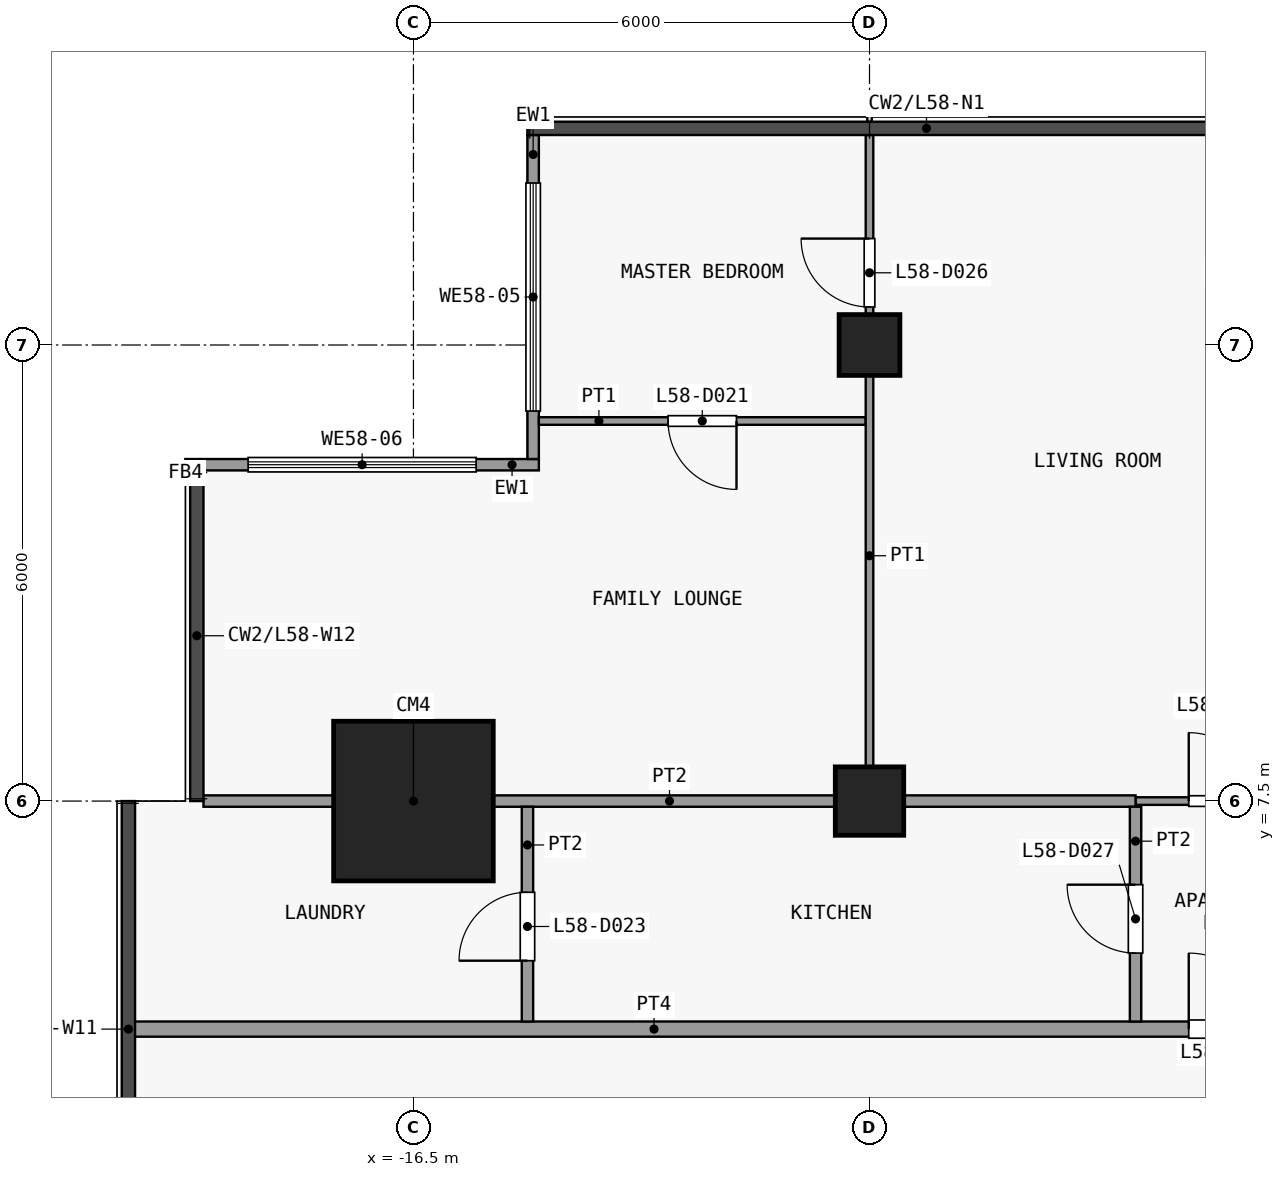
"""IFC4 building model, lengths in metres.
Left out: names, types, materials, properties, quantities, classifications, styles, units other than length and angle.
Written with IfcOpenShell. Run it as: python <this file> out.ifc"""

import sys

from ifc_helpers import new_model, si_unit, direction, frame, frame_2d, origin, origin_2d, place, context, subcontext, project, spatial, rectangle, extrude, element, fill, save


model = new_model("IFC4")
c1 = context("Model", 3, precision=1e-05, world=origin(), true_north=direction((0.0, 1.0)))
c2 = subcontext(c1, "Body", "Model", "MODEL_VIEW")
j1 = project(units=[si_unit("LENGTHUNIT", "METRE"), si_unit("PLANEANGLEUNIT", "RADIAN")], contexts=[c1])
p1 = place(None, origin())
s1 = spatial("IfcSite", under=j1, at=p1, CompositionType="ELEMENT")
p2 = place(p1, origin())
s2 = spatial("IfcBuilding", under=s1, at=p2, CompositionType="ELEMENT")
p3 = place(p2, frame((0.0, 0.0, 230.3)))
s3 = spatial("IfcBuildingStorey", under=s2, at=p3, CompositionType="ELEMENT", Elevation=230.3)
p4 = place(p3, frame((-16.5, 7.5, 0.0), z_axis=(0.0, 0.0, 1.0), x_axis=(1.0, 0.0, 0.0)))
e1 = element("IfcColumn", 1, at=p4, inside=s3, PredefinedType="COLUMN", context=c2, shape_type="SweptSolid", body=[
    extrude(rectangle(XDim=2.1, YDim=2.1, at=origin_2d()), origin(), (0.0, 0.0, 1.0), 3.6),
])
p5 = place(p3, frame((-10.5, 7.5, 0.0), z_axis=(0.0, 0.0, 1.0), x_axis=(1.0, 0.0, 0.0)))
e2 = element("IfcColumn", 2, at=p5, inside=s3, PredefinedType="COLUMN", context=c2, shape_type="SweptSolid", body=[
    extrude(rectangle(XDim=0.9, YDim=0.9, at=origin_2d()), origin(), (0.0, 0.0, 1.0), 3.6),
])
p6 = place(p3, frame((-10.5, 13.5, 0.0), z_axis=(0.0, 0.0, 1.0), x_axis=(1.0, 0.0, 0.0)))
e3 = element("IfcColumn", 3, at=p6, inside=s3, PredefinedType="COLUMN", context=c2, shape_type="SweptSolid", body=[
    extrude(rectangle(XDim=0.8, YDim=0.8, at=origin_2d()), origin(), (0.0, 0.0, 1.0), 3.6),
])
p7 = place(p3, frame((-14.925, 12.0, 0.0), z_axis=(0.0, 0.0, 1.0), x_axis=(0.0, 1.0, 0.0)))
e4 = element("IfcWall", 4, at=p7, inside=s3, PredefinedType="SOLIDWALL", context=c2, shape_type="SweptSolid", body=[
    extrude(rectangle(XDim=4.262, YDim=0.15, at=frame_2d((2.131, 0.0))), origin(), (0.0, 0.0, 1.0), 3.3),
])
p8 = place(p7, frame((0.631, 0.0, 0.9)))
e5 = element("IfcOpeningElement", 5, at=p8, cuts=e4, PredefinedType="OPENING", context=c2, shape_type="SweptSolid", body=[
    extrude(rectangle(XDim=3.0, YDim=2.4, at=frame_2d((1.5, 1.2))), frame((0.0, 0.085, 0.0), z_axis=(0.0, -1.0, 0.0), x_axis=(1.0, 0.0, 0.0)), (0.0, 0.0, 1.0), 0.17),
])
p9 = place(p3, frame((-19.5, 11.925, 0.0), z_axis=(0.0, 0.0, 1.0), x_axis=(1.0, 0.0, 0.0)))
e6 = element("IfcWall", 6, at=p9, inside=s3, PredefinedType="SOLIDWALL", context=c2, shape_type="SweptSolid", body=[
    extrude(rectangle(XDim=4.65, YDim=0.15, at=frame_2d((2.325, 0.0))), origin(), (0.0, 0.0, 1.0), 3.3),
])
p10 = place(p9, frame((0.825, 0.0, 0.9)))
e7 = element("IfcOpeningElement", 7, at=p10, cuts=e6, PredefinedType="OPENING", context=c2, shape_type="SweptSolid", body=[
    extrude(rectangle(XDim=3.0, YDim=2.4, at=frame_2d((1.5, 1.2))), frame((0.0, 0.085, 0.0), z_axis=(0.0, -1.0, 0.0), x_axis=(1.0, 0.0, 0.0)), (0.0, 0.0, 1.0), 0.17),
])
p11 = place(p3, frame((-20.25, 4.5, 0.0), z_axis=(0.0, 0.0, 1.0), x_axis=(1.0, 0.0, 0.0)))
e8 = element("IfcWall", 8, at=p11, inside=s3, PredefinedType="PARTITIONING", context=c2, shape_type="SweptSolid", body=[
    extrude(rectangle(XDim=39.6, YDim=0.2, at=frame_2d((19.8, 0.0))), origin(), (0.0, 0.0, 1.0), 3.3),
])
p12 = place(p11, frame((13.95, 0.0, 0.0)))
e9 = element("IfcOpeningElement", 9, at=p12, cuts=e8, PredefinedType="OPENING", context=c2, shape_type="SweptSolid", body=[
    extrude(rectangle(XDim=1.0, YDim=2.1, at=frame_2d((0.5, 1.05))), frame((0.0, 0.11, 0.0), z_axis=(0.0, -1.0, 0.0), x_axis=(1.0, 0.0, 0.0)), (0.0, 0.0, 1.0), 0.22),
])
p13 = place(p11, frame((27.25, 0.0, 0.0)))
e10 = element("IfcOpeningElement", 10, at=p13, cuts=e8, PredefinedType="OPENING", context=c2, shape_type="SweptSolid", body=[
    extrude(rectangle(XDim=0.9, YDim=2.1, at=frame_2d((0.45, 1.05))), frame((0.0, 0.11, 0.0), z_axis=(0.0, -1.0, 0.0), x_axis=(1.0, 0.0, 0.0)), (0.0, 0.0, 1.0), 0.22),
])
p14 = place(p11, frame((33.25, 0.0, 0.0)))
e11 = element("IfcOpeningElement", 11, at=p14, cuts=e8, PredefinedType="OPENING", context=c2, shape_type="SweptSolid", body=[
    extrude(rectangle(XDim=0.9, YDim=2.1, at=frame_2d((0.45, 1.05))), frame((0.0, 0.11, 0.0), z_axis=(0.0, -1.0, 0.0), x_axis=(1.0, 0.0, 0.0)), (0.0, 0.0, 1.0), 0.22),
])
p15 = place(p11, frame((37.75, 0.0, 0.0)))
e12 = element("IfcOpeningElement", 12, at=p15, cuts=e8, PredefinedType="OPENING", context=c2, shape_type="SweptSolid", body=[
    extrude(rectangle(XDim=0.9, YDim=2.1, at=frame_2d((0.45, 1.05))), frame((0.0, 0.11, 0.0), z_axis=(0.0, -1.0, 0.0), x_axis=(1.0, 0.0, 0.0)), (0.0, 0.0, 1.0), 0.22),
])
p16 = place(p3, frame((-7.0, 7.5, 0.0), z_axis=(0.0, 0.0, 1.0), x_axis=(1.0, 0.0, 0.0)))
e13 = element("IfcWall", 13, at=p16, inside=s3, PredefinedType="PARTITIONING", context=c2, shape_type="SweptSolid", body=[
    extrude(rectangle(XDim=2.4, YDim=0.1, at=frame_2d((1.2, 0.0))), origin(), (0.0, 0.0, 1.0), 3.3),
])
p17 = place(p16, frame((0.7, 0.0, 0.0)))
e14 = element("IfcOpeningElement", 14, at=p17, cuts=e13, PredefinedType="OPENING", context=c2, shape_type="SweptSolid", body=[
    extrude(rectangle(XDim=0.9, YDim=2.1, at=frame_2d((0.45, 1.05))), frame((0.0, 0.06, 0.0), z_axis=(0.0, -1.0, 0.0), x_axis=(1.0, 0.0, 0.0)), (0.0, 0.0, 1.0), 0.12),
])
p18 = place(p3, frame((-19.262, 7.5, 0.0), z_axis=(0.0, 0.0, 1.0), x_axis=(1.0, 0.0, 0.0)))
e15 = element("IfcWall", 15, at=p18, inside=s3, PredefinedType="PARTITIONING", context=c2, shape_type="SweptSolid", body=[
    extrude(rectangle(XDim=12.262, YDim=0.15, at=frame_2d((6.131, 0.0))), origin(), (0.0, 0.0, 1.0), 3.3),
])
p19 = place(p3, frame((-14.85, 12.5, 0.0), z_axis=(0.0, 0.0, 1.0), x_axis=(1.0, 0.0, 0.0)))
e16 = element("IfcWall", 16, at=p19, inside=s3, PredefinedType="PARTITIONING", context=c2, shape_type="SweptSolid", body=[
    extrude(rectangle(XDim=4.3, YDim=0.1, at=frame_2d((2.15, 0.0))), origin(), (0.0, 0.0, 1.0), 3.3),
])
p20 = place(p19, frame((1.7, 0.0, 0.0)))
e17 = element("IfcOpeningElement", 17, at=p20, cuts=e16, PredefinedType="OPENING", context=c2, shape_type="SweptSolid", body=[
    extrude(rectangle(XDim=0.9, YDim=2.1, at=frame_2d((0.45, 1.05))), frame((0.0, 0.06, 0.0), z_axis=(0.0, -1.0, 0.0), x_axis=(1.0, 0.0, 0.0)), (0.0, 0.0, 1.0), 0.12),
])
p21 = place(p3, frame((-15.0, 4.6, 0.0), z_axis=(0.0, 0.0, 1.0), x_axis=(0.0, 1.0, 0.0)))
e18 = element("IfcWall", 18, at=p21, inside=s3, PredefinedType="PARTITIONING", context=c2, shape_type="SweptSolid", body=[
    extrude(rectangle(XDim=2.825, YDim=0.15, at=frame_2d((1.413, 0.0))), origin(), (0.0, 0.0, 1.0), 3.3),
])
p22 = place(p21, frame((0.8, 0.0, 0.0)))
e19 = element("IfcOpeningElement", 19, at=p22, cuts=e18, PredefinedType="OPENING", context=c2, shape_type="SweptSolid", body=[
    extrude(rectangle(XDim=0.9, YDim=2.1, at=frame_2d((0.45, 1.05))), frame((0.0, 0.085, 0.0), z_axis=(0.0, -1.0, 0.0), x_axis=(1.0, 0.0, 0.0)), (0.0, 0.0, 1.0), 0.17),
])
p23 = place(p3, frame((-10.5, 7.575, 0.0), z_axis=(0.0, 0.0, 1.0), x_axis=(0.0, 1.0, 0.0)))
e20 = element("IfcWall", 20, at=p23, inside=s3, PredefinedType="PARTITIONING", context=c2, shape_type="SweptSolid", body=[
    extrude(rectangle(XDim=8.688, YDim=0.1, at=frame_2d((4.344, 0.0))), origin(), (0.0, 0.0, 1.0), 3.3),
])
p24 = place(p23, frame((6.425, 0.0, 0.0)))
e21 = element("IfcOpeningElement", 21, at=p24, cuts=e20, PredefinedType="OPENING", context=c2, shape_type="SweptSolid", body=[
    extrude(rectangle(XDim=0.9, YDim=2.1, at=frame_2d((0.45, 1.05))), frame((0.0, 0.06, 0.0), z_axis=(0.0, -1.0, 0.0), x_axis=(1.0, 0.0, 0.0)), (0.0, 0.0, 1.0), 0.12),
])
p25 = place(p3, frame((-7.0, 4.6, 0.0), z_axis=(0.0, 0.0, 1.0), x_axis=(0.0, 1.0, 0.0)))
e22 = element("IfcWall", 22, at=p25, inside=s3, PredefinedType="PARTITIONING", context=c2, shape_type="SweptSolid", body=[
    extrude(rectangle(XDim=2.825, YDim=0.15, at=frame_2d((1.413, 0.0))), origin(), (0.0, 0.0, 1.0), 3.3),
])
p26 = place(p25, frame((0.9, 0.0, 0.0)))
e23 = element("IfcOpeningElement", 23, at=p26, cuts=e22, PredefinedType="OPENING", context=c2, shape_type="SweptSolid", body=[
    extrude(rectangle(XDim=0.9, YDim=2.1, at=frame_2d((0.45, 1.05))), frame((0.0, 0.085, 0.0), z_axis=(0.0, -1.0, 0.0), x_axis=(1.0, 0.0, 0.0)), (0.0, 0.0, 1.0), 0.17),
])
p27 = place(p8, origin())
e24 = element("IfcWindow", 24, at=p27, inside=s3, PartitioningType="SINGLE_PANEL", PredefinedType="WINDOW", context=c2, shape_type="SweptSolid", body=[
    extrude(rectangle(XDim=3.0, YDim=2.4, at=frame_2d((1.5, 1.2))), frame((0.0, 0.03, 0.0), z_axis=(0.0, -1.0, 0.0), x_axis=(1.0, 0.0, 0.0)), (0.0, 0.0, 1.0), 0.06),
])
fill(e5, e24)
p28 = place(p10, origin())
e25 = element("IfcWindow", 25, at=p28, inside=s3, PartitioningType="SINGLE_PANEL", PredefinedType="WINDOW", context=c2, shape_type="SweptSolid", body=[
    extrude(rectangle(XDim=3.0, YDim=2.4, at=frame_2d((1.5, 1.2))), frame((0.0, 0.03, 0.0), z_axis=(0.0, -1.0, 0.0), x_axis=(1.0, 0.0, 0.0)), (0.0, 0.0, 1.0), 0.06),
])
fill(e7, e25)
p29 = place(p12, origin())
e26 = element("IfcDoor", 26, at=p29, inside=s3, OperationType="SINGLE_SWING_RIGHT", PredefinedType="DOOR", context=c2, shape_type="SweptSolid", body=[
    extrude(rectangle(XDim=1.0, YDim=2.1, at=frame_2d((0.5, 1.05))), frame((0.0, 0.025, 0.0), z_axis=(0.0, -1.0, 0.0), x_axis=(1.0, 0.0, 0.0)), (0.0, 0.0, 1.0), 0.05),
])
fill(e9, e26)
p30 = place(p17, origin())
e27 = element("IfcDoor", 27, at=p30, inside=s3, OperationType="SINGLE_SWING_RIGHT", PredefinedType="DOOR", context=c2, shape_type="SweptSolid", body=[
    extrude(rectangle(XDim=0.9, YDim=2.1, at=frame_2d((0.45, 1.05))), frame((0.0, 0.025, 0.0), z_axis=(0.0, -1.0, 0.0), x_axis=(1.0, 0.0, 0.0)), (0.0, 0.0, 1.0), 0.05),
])
fill(e14, e27)
p31 = place(p20, origin())
e28 = element("IfcDoor", 28, at=p31, inside=s3, OperationType="SINGLE_SWING_RIGHT", PredefinedType="DOOR", context=c2, shape_type="SweptSolid", body=[
    extrude(rectangle(XDim=0.9, YDim=2.1, at=frame_2d((0.45, 1.05))), frame((0.0, 0.025, 0.0), z_axis=(0.0, -1.0, 0.0), x_axis=(1.0, 0.0, 0.0)), (0.0, 0.0, 1.0), 0.05),
])
fill(e17, e28)
p32 = place(p22, origin())
e29 = element("IfcDoor", 29, at=p32, inside=s3, OperationType="SINGLE_SWING_RIGHT", PredefinedType="DOOR", context=c2, shape_type="SweptSolid", body=[
    extrude(rectangle(XDim=0.9, YDim=2.1, at=frame_2d((0.45, 1.05))), frame((0.0, 0.025, 0.0), z_axis=(0.0, -1.0, 0.0), x_axis=(1.0, 0.0, 0.0)), (0.0, 0.0, 1.0), 0.05),
])
fill(e19, e29)
p33 = place(p24, origin())
e30 = element("IfcDoor", 30, at=p33, inside=s3, OperationType="SINGLE_SWING_LEFT", PredefinedType="DOOR", context=c2, shape_type="SweptSolid", body=[
    extrude(rectangle(XDim=0.9, YDim=2.1, at=frame_2d((0.45, 1.05))), frame((0.0, 0.025, 0.0), z_axis=(0.0, -1.0, 0.0), x_axis=(1.0, 0.0, 0.0)), (0.0, 0.0, 1.0), 0.05),
])
fill(e21, e30)
p34 = place(p26, origin())
e31 = element("IfcDoor", 31, at=p34, inside=s3, OperationType="SINGLE_SWING_LEFT", PredefinedType="DOOR", context=c2, shape_type="SweptSolid", body=[
    extrude(rectangle(XDim=0.9, YDim=2.1, at=frame_2d((0.45, 1.05))), frame((0.0, 0.025, 0.0), z_axis=(0.0, -1.0, 0.0), x_axis=(1.0, 0.0, 0.0)), (0.0, 0.0, 1.0), 0.05),
])
fill(e23, e31)
save(model, sys.argv[1])
